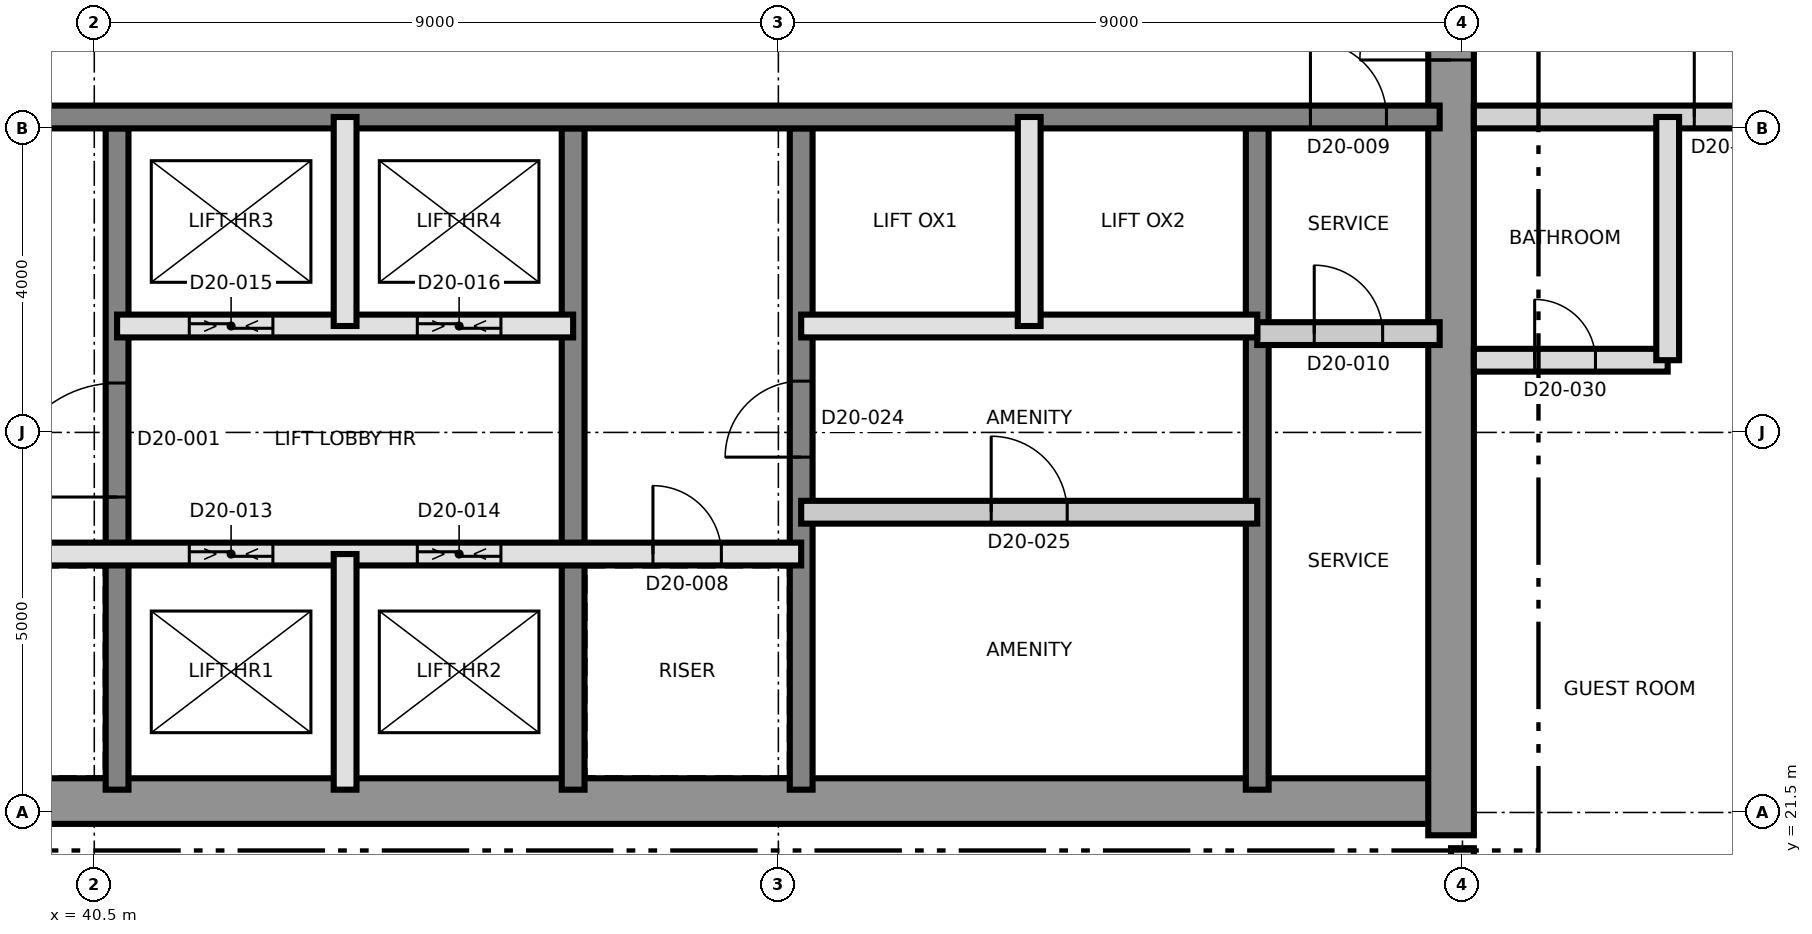
"""IFC4 building model, lengths in metres.
Left out: names, types, materials, properties, quantities, classifications, styles, units other than length and angle.
Written with IfcOpenShell. Run it as: python <this file> out.ifc"""

import sys

from ifc_helpers import new_model, si_unit, direction, frame, frame_2d, origin, place, context, subcontext, project, spatial, rectangle, extrude, element, fill, save


model = new_model("IFC4")
c1 = context("Model", 3, precision=1e-05, world=origin(), true_north=direction((0.0, 1.0)))
c2 = subcontext(c1, "Body", "Model", "MODEL_VIEW")
j1 = project(units=[si_unit("LENGTHUNIT", "METRE"), si_unit("PLANEANGLEUNIT", "RADIAN")], contexts=[c1])
p1 = place(None, origin())
s1 = spatial("IfcSite", under=j1, at=p1, CompositionType="ELEMENT")
p2 = place(p1, origin())
s2 = spatial("IfcBuilding", under=s1, at=p2, CompositionType="ELEMENT")
p3 = place(p2, frame((0.0, 0.0, 182.9)))
s3 = spatial("IfcBuildingStorey", under=s2, at=p3, CompositionType="ELEMENT", Elevation=182.9)
p4 = place(p3, frame((31.2, 21.65, 0.0), z_axis=(0.0, 0.0, 1.0), x_axis=(1.0, 0.0, 0.0)))
e1 = element("IfcWall", 1, at=p4, inside=s3, PredefinedType="SHEAR", context=c2, shape_type="SweptSolid", body=[
    extrude(rectangle(XDim=27.0, YDim=0.6, at=frame_2d((13.5, 0.0))), origin(), (0.0, 0.0, 1.0), 3.7),
])
p5 = place(p3, frame((58.35, 21.2, 0.0), z_axis=(0.0, 0.0, 1.0), x_axis=(0.0, 1.0, 0.0)))
e2 = element("IfcWall", 2, at=p5, inside=s3, PredefinedType="SHEAR", context=c2, shape_type="SweptSolid", body=[
    extrude(rectangle(XDim=18.6, YDim=0.6, at=frame_2d((9.3, 0.0))), origin(), (0.0, 0.0, 1.0), 3.7),
])
p6 = place(p5, frame((10.2, 0.0, 0.0)))
e3 = element("IfcOpeningElement", 3, at=p6, cuts=e2, PredefinedType="OPENING", context=c2, shape_type="SweptSolid", body=[
    extrude(rectangle(XDim=1.2, YDim=2.1, at=frame_2d((0.6, 1.05))), frame((0.0, 0.31, 0.0), z_axis=(0.0, -1.0, 0.0), x_axis=(1.0, 0.0, 0.0)), (0.0, 0.0, 1.0), 0.62),
])
p7 = place(p3, frame((40.8, 21.8, 0.0), z_axis=(0.0, 0.0, 1.0), x_axis=(0.0, 1.0, 0.0)))
e4 = element("IfcWall", 4, at=p7, inside=s3, PredefinedType="SHEAR", context=c2, shape_type="SweptSolid", body=[
    extrude(rectangle(XDim=8.7, YDim=0.3, at=frame_2d((4.35, 0.0))), origin(), (0.0, 0.0, 1.0), 3.7),
])
p8 = place(p7, frame((3.85, 0.0, 0.0)))
e5 = element("IfcOpeningElement", 5, at=p8, cuts=e4, PredefinedType="OPENING", context=c2, shape_type="SweptSolid", body=[
    extrude(rectangle(XDim=1.5, YDim=2.1, at=frame_2d((0.75, 1.05))), frame((0.0, 0.16, 0.0), z_axis=(0.0, -1.0, 0.0), x_axis=(1.0, 0.0, 0.0)), (0.0, 0.0, 1.0), 0.32),
])
p9 = place(p3, frame((46.8, 21.8, 0.0), z_axis=(0.0, 0.0, 1.0), x_axis=(0.0, 1.0, 0.0)))
e6 = element("IfcWall", 6, at=p9, inside=s3, PredefinedType="SHEAR", context=c2, shape_type="SweptSolid", body=[
    extrude(rectangle(XDim=8.7, YDim=0.3, at=frame_2d((4.35, 0.0))), origin(), (0.0, 0.0, 1.0), 3.7),
])
p10 = place(p3, frame((49.8, 21.8, 0.0), z_axis=(0.0, 0.0, 1.0), x_axis=(0.0, 1.0, 0.0)))
e7 = element("IfcWall", 7, at=p10, inside=s3, PredefinedType="SHEAR", context=c2, shape_type="SweptSolid", body=[
    extrude(rectangle(XDim=8.7, YDim=0.3, at=frame_2d((4.35, 0.0))), origin(), (0.0, 0.0, 1.0), 3.7),
])
p11 = place(p10, frame((4.375, 0.0, 0.0)))
e8 = element("IfcOpeningElement", 8, at=p11, cuts=e7, PredefinedType="OPENING", context=c2, shape_type="SweptSolid", body=[
    extrude(rectangle(XDim=1.0, YDim=2.1, at=frame_2d((0.5, 1.05))), frame((0.0, 0.16, 0.0), z_axis=(0.0, -1.0, 0.0), x_axis=(1.0, 0.0, 0.0)), (0.0, 0.0, 1.0), 0.32),
])
p12 = place(p3, frame((55.8, 21.8, 0.0), z_axis=(0.0, 0.0, 1.0), x_axis=(0.0, 1.0, 0.0)))
e9 = element("IfcWall", 9, at=p12, inside=s3, PredefinedType="SHEAR", context=c2, shape_type="SweptSolid", body=[
    extrude(rectangle(XDim=8.7, YDim=0.3, at=frame_2d((4.35, 0.0))), origin(), (0.0, 0.0, 1.0), 3.7),
])
p13 = place(p3, frame((31.8, 30.65, 0.0), z_axis=(0.0, 0.0, 1.0), x_axis=(1.0, 0.0, 0.0)))
e10 = element("IfcWall", 10, at=p13, inside=s3, PredefinedType="SHEAR", context=c2, shape_type="SweptSolid", body=[
    extrude(rectangle(XDim=26.4, YDim=0.3, at=frame_2d((13.2, 0.0))), origin(), (0.0, 0.0, 1.0), 3.7),
])
p14 = place(p13, frame((24.7, 0.0, 0.0)))
e11 = element("IfcOpeningElement", 11, at=p14, cuts=e10, PredefinedType="OPENING", context=c2, shape_type="SweptSolid", body=[
    extrude(rectangle(XDim=1.0, YDim=2.1, at=frame_2d((0.5, 1.05))), frame((0.0, 0.16, 0.0), z_axis=(0.0, -1.0, 0.0), x_axis=(1.0, 0.0, 0.0)), (0.0, 0.0, 1.0), 0.32),
])
p15 = place(p13, frame((4.0, 0.0, 0.0)))
e12 = element("IfcOpeningElement", 12, at=p15, cuts=e10, PredefinedType="OPENING", context=c2, shape_type="SweptSolid", body=[
    extrude(rectangle(XDim=1.0, YDim=2.1, at=frame_2d((0.5, 1.05))), frame((0.0, 0.16, 0.0), z_axis=(0.0, -1.0, 0.0), x_axis=(1.0, 0.0, 0.0)), (0.0, 0.0, 1.0), 0.32),
])
p16 = place(p3, frame((37.8, 24.9, 0.0), z_axis=(0.0, 0.0, 1.0), x_axis=(1.0, 0.0, 0.0)))
e13 = element("IfcWall", 13, at=p16, inside=s3, PredefinedType="SOLIDWALL", context=c2, shape_type="SweptSolid", body=[
    extrude(rectangle(XDim=12.0, YDim=0.3, at=frame_2d((6.0, 0.0))), origin(), (0.0, 0.0, 1.0), 3.4),
])
p17 = place(p16, frame((1.05, 0.0, 0.0)))
e14 = element("IfcOpeningElement", 14, at=p17, cuts=e13, PredefinedType="OPENING", context=c2, shape_type="SweptSolid", body=[
    extrude(rectangle(XDim=0.9, YDim=2.1, at=frame_2d((0.45, 1.05))), frame((0.0, 0.16, 0.0), z_axis=(0.0, -1.0, 0.0), x_axis=(1.0, 0.0, 0.0)), (0.0, 0.0, 1.0), 0.32),
])
p18 = place(p16, frame((10.05, 0.0, 0.0)))
e15 = element("IfcOpeningElement", 15, at=p18, cuts=e13, PredefinedType="OPENING", context=c2, shape_type="SweptSolid", body=[
    extrude(rectangle(XDim=0.9, YDim=2.1, at=frame_2d((0.45, 1.05))), frame((0.0, 0.16, 0.0), z_axis=(0.0, -1.0, 0.0), x_axis=(1.0, 0.0, 0.0)), (0.0, 0.0, 1.0), 0.32),
])
p19 = place(p16, frame((3.95, 0.0, 0.0)))
e16 = element("IfcOpeningElement", 16, at=p19, cuts=e13, PredefinedType="OPENING", context=c2, shape_type="SweptSolid", body=[
    extrude(rectangle(XDim=1.1, YDim=2.4, at=frame_2d((0.55, 1.2))), frame((0.0, 0.16, 0.0), z_axis=(0.0, -1.0, 0.0), x_axis=(1.0, 0.0, 0.0)), (0.0, 0.0, 1.0), 0.32),
])
p20 = place(p16, frame((6.95, 0.0, 0.0)))
e17 = element("IfcOpeningElement", 17, at=p20, cuts=e13, PredefinedType="OPENING", context=c2, shape_type="SweptSolid", body=[
    extrude(rectangle(XDim=1.1, YDim=2.4, at=frame_2d((0.55, 1.2))), frame((0.0, 0.16, 0.0), z_axis=(0.0, -1.0, 0.0), x_axis=(1.0, 0.0, 0.0)), (0.0, 0.0, 1.0), 0.32),
])
p21 = place(p3, frame((49.8, 25.45, 0.0), z_axis=(0.0, 0.0, 1.0), x_axis=(1.0, 0.0, 0.0)))
e18 = element("IfcWall", 18, at=p21, inside=s3, PredefinedType="PARTITIONING", context=c2, shape_type="SweptSolid", body=[
    extrude(rectangle(XDim=6.0, YDim=0.3, at=frame_2d((3.0, 0.0))), origin(), (0.0, 0.0, 1.0), 3.4),
])
p22 = place(p21, frame((2.5, 0.0, 0.0)))
e19 = element("IfcOpeningElement", 19, at=p22, cuts=e18, PredefinedType="OPENING", context=c2, shape_type="SweptSolid", body=[
    extrude(rectangle(XDim=1.0, YDim=2.1, at=frame_2d((0.5, 1.05))), frame((0.0, 0.16, 0.0), z_axis=(0.0, -1.0, 0.0), x_axis=(1.0, 0.0, 0.0)), (0.0, 0.0, 1.0), 0.32),
])
p23 = place(p3, frame((55.8, 27.8, 0.0), z_axis=(0.0, 0.0, 1.0), x_axis=(1.0, 0.0, 0.0)))
e20 = element("IfcWall", 20, at=p23, inside=s3, PredefinedType="PARTITIONING", context=c2, shape_type="SweptSolid", body=[
    extrude(rectangle(XDim=2.4, YDim=0.3, at=frame_2d((1.2, 0.0))), origin(), (0.0, 0.0, 1.0), 3.4),
])
p24 = place(p23, frame((0.75, 0.0, 0.0)))
e21 = element("IfcOpeningElement", 21, at=p24, cuts=e20, PredefinedType="OPENING", context=c2, shape_type="SweptSolid", body=[
    extrude(rectangle(XDim=0.9, YDim=2.1, at=frame_2d((0.45, 1.05))), frame((0.0, 0.16, 0.0), z_axis=(0.0, -1.0, 0.0), x_axis=(1.0, 0.0, 0.0)), (0.0, 0.0, 1.0), 0.32),
])
p25 = place(p3, frame((40.8, 27.9, 0.0), z_axis=(0.0, 0.0, 1.0), x_axis=(1.0, 0.0, 0.0)))
e22 = element("IfcWall", 22, at=p25, inside=s3, PredefinedType="SOLIDWALL", context=c2, shape_type="SweptSolid", body=[
    extrude(rectangle(XDim=6.0, YDim=0.3, at=frame_2d((3.0, 0.0))), origin(), (0.0, 0.0, 1.0), 3.4),
])
p26 = place(p25, frame((0.95, 0.0, 0.0)))
e23 = element("IfcOpeningElement", 23, at=p26, cuts=e22, PredefinedType="OPENING", context=c2, shape_type="SweptSolid", body=[
    extrude(rectangle(XDim=1.1, YDim=2.4, at=frame_2d((0.55, 1.2))), frame((0.0, 0.16, 0.0), z_axis=(0.0, -1.0, 0.0), x_axis=(1.0, 0.0, 0.0)), (0.0, 0.0, 1.0), 0.32),
])
p27 = place(p25, frame((3.95, 0.0, 0.0)))
e24 = element("IfcOpeningElement", 24, at=p27, cuts=e22, PredefinedType="OPENING", context=c2, shape_type="SweptSolid", body=[
    extrude(rectangle(XDim=1.1, YDim=2.4, at=frame_2d((0.55, 1.2))), frame((0.0, 0.16, 0.0), z_axis=(0.0, -1.0, 0.0), x_axis=(1.0, 0.0, 0.0)), (0.0, 0.0, 1.0), 0.32),
])
p28 = place(p3, frame((49.8, 27.9, 0.0), z_axis=(0.0, 0.0, 1.0), x_axis=(1.0, 0.0, 0.0)))
e25 = element("IfcWall", 25, at=p28, inside=s3, PredefinedType="SOLIDWALL", context=c2, shape_type="SweptSolid", body=[
    extrude(rectangle(XDim=6.0, YDim=0.3, at=frame_2d((3.0, 0.0))), origin(), (0.0, 0.0, 1.0), 3.4),
])
p29 = place(p3, frame((43.8, 21.8, 0.0), z_axis=(0.0, 0.0, 1.0), x_axis=(0.0, 1.0, 0.0)))
e26 = element("IfcWall", 26, at=p29, inside=s3, PredefinedType="SOLIDWALL", context=c2, shape_type="SweptSolid", body=[
    extrude(rectangle(XDim=3.1, YDim=0.3, at=frame_2d((1.55, 0.0))), origin(), (0.0, 0.0, 1.0), 3.4),
])
for number, where, z_axis, x_axis in (
    (27, (43.8, 27.9, 0.0), (0.0, 0.0, 1.0), (0.0, 1.0, 0.0)),
    (28, (52.8, 27.9, 0.0), (0.0, 0.0, 1.0), (0.0, 1.0, 0.0)),
):
    element("IfcWall", number, at=place(p3, frame(where, z_axis=z_axis, x_axis=x_axis)), inside=s3, PredefinedType="SOLIDWALL", context=c2, shape_type="SweptSolid", body=[
        extrude(rectangle(XDim=2.75, YDim=0.3, at=frame_2d((1.375, 0.0))), origin(), (0.0, 0.0, 1.0), 3.4),
    ])
p30 = place(p3, frame((58.65, 27.45, 0.0), z_axis=(0.0, 0.0, 1.0), x_axis=(1.0, 0.0, 0.0)))
e29 = element("IfcWall", 29, at=p30, inside=s3, PredefinedType="PARTITIONING", context=c2, shape_type="SweptSolid", body=[
    extrude(rectangle(XDim=2.55, YDim=0.3, at=frame_2d((1.275, 0.0))), origin(), (0.0, 0.0, 1.0), 3.4),
])
p31 = place(p30, frame((0.8, 0.0, 0.0)))
e30 = element("IfcOpeningElement", 30, at=p31, cuts=e29, PredefinedType="OPENING", context=c2, shape_type="SweptSolid", body=[
    extrude(rectangle(XDim=0.8, YDim=2.1, at=frame_2d((0.4, 1.05))), frame((0.0, 0.16, 0.0), z_axis=(0.0, -1.0, 0.0), x_axis=(1.0, 0.0, 0.0)), (0.0, 0.0, 1.0), 0.32),
])
p32 = place(p3, frame((58.65, 30.65, 0.0), z_axis=(0.0, 0.0, 1.0), x_axis=(1.0, 0.0, 0.0)))
e31 = element("IfcWall", 31, at=p32, inside=s3, PredefinedType="PARTITIONING", context=c2, shape_type="SweptSolid", body=[
    extrude(rectangle(XDim=26.68, YDim=0.3, at=frame_2d((13.34, 0.0))), origin(), (0.0, 0.0, 1.0), 3.4),
])
p33 = place(p32, frame((2.9, 0.0, 0.0)))
e32 = element("IfcOpeningElement", 32, at=p33, cuts=e31, PredefinedType="OPENING", context=c2, shape_type="SweptSolid", body=[
    extrude(rectangle(XDim=1.0, YDim=2.1, at=frame_2d((0.5, 1.05))), frame((0.0, 0.16, 0.0), z_axis=(0.0, -1.0, 0.0), x_axis=(1.0, 0.0, 0.0)), (0.0, 0.0, 1.0), 0.32),
])
p34 = place(p32, frame((5.85, 0.0, 0.0)))
e33 = element("IfcOpeningElement", 33, at=p34, cuts=e31, PredefinedType="OPENING", context=c2, shape_type="SweptSolid", body=[
    extrude(rectangle(XDim=1.4, YDim=2.1, at=frame_2d((0.7, 1.05))), frame((0.0, 0.16, 0.0), z_axis=(0.0, -1.0, 0.0), x_axis=(1.0, 0.0, 0.0)), (0.0, 0.0, 1.0), 0.32),
])
p35 = place(p32, frame((10.0, 0.0, 0.0)))
e34 = element("IfcOpeningElement", 34, at=p35, cuts=e31, PredefinedType="OPENING", context=c2, shape_type="SweptSolid", body=[
    extrude(rectangle(XDim=1.0, YDim=2.1, at=frame_2d((0.5, 1.05))), frame((0.0, 0.16, 0.0), z_axis=(0.0, -1.0, 0.0), x_axis=(1.0, 0.0, 0.0)), (0.0, 0.0, 1.0), 0.32),
])
p36 = place(p32, frame((15.85, 0.0, 0.0)))
e35 = element("IfcOpeningElement", 35, at=p36, cuts=e31, PredefinedType="OPENING", context=c2, shape_type="SweptSolid", body=[
    extrude(rectangle(XDim=1.0, YDim=2.1, at=frame_2d((0.5, 1.05))), frame((0.0, 0.16, 0.0), z_axis=(0.0, -1.0, 0.0), x_axis=(1.0, 0.0, 0.0)), (0.0, 0.0, 1.0), 0.32),
])
p37 = place(p32, frame((20.2, 0.0, 0.0)))
e36 = element("IfcOpeningElement", 36, at=p37, cuts=e31, PredefinedType="OPENING", context=c2, shape_type="SweptSolid", body=[
    extrude(rectangle(XDim=1.0, YDim=2.1, at=frame_2d((0.5, 1.05))), frame((0.0, 0.16, 0.0), z_axis=(0.0, -1.0, 0.0), x_axis=(1.0, 0.0, 0.0)), (0.0, 0.0, 1.0), 0.32),
])
p38 = place(p3, frame((58.5, 19.17, 0.0), z_axis=(0.0, 0.0, 1.0), x_axis=(0.0, 1.0, 0.0)))
e37 = element("IfcWall", 37, at=p38, inside=s3, PredefinedType="PARTITIONING", context=c2, shape_type="SweptSolid", body=[
    extrude(rectangle(XDim=1.86, YDim=0.3, at=frame_2d((0.93, 0.0))), origin(), (0.0, 0.0, 1.0), 3.4),
])
p39 = place(p3, frame((61.2, 27.45, 0.0), z_axis=(0.0, 0.0, 1.0), x_axis=(0.0, 1.0, 0.0)))
e38 = element("IfcWall", 38, at=p39, inside=s3, PredefinedType="PARTITIONING", context=c2, shape_type="SweptSolid", body=[
    extrude(rectangle(XDim=3.2, YDim=0.3, at=frame_2d((1.6, 0.0))), origin(), (0.0, 0.0, 1.0), 3.4),
])
p40 = place(p8, origin())
e39 = element("IfcDoor", 39, at=p40, inside=s3, OperationType="SINGLE_SWING_RIGHT", PredefinedType="DOOR", context=c2, shape_type="SweptSolid", body=[
    extrude(rectangle(XDim=1.5, YDim=2.1, at=frame_2d((0.75, 1.05))), frame((0.0, 0.025, 0.0), z_axis=(0.0, -1.0, 0.0), x_axis=(1.0, 0.0, 0.0)), (0.0, 0.0, 1.0), 0.05),
])
fill(e5, e39)
p41 = place(p18, origin())
e40 = element("IfcDoor", 40, at=p41, inside=s3, OperationType="SINGLE_SWING_RIGHT", PredefinedType="DOOR", context=c2, shape_type="SweptSolid", body=[
    extrude(rectangle(XDim=0.9, YDim=2.1, at=frame_2d((0.45, 1.05))), frame((0.0, 0.025, 0.0), z_axis=(0.0, -1.0, 0.0), x_axis=(1.0, 0.0, 0.0)), (0.0, 0.0, 1.0), 0.05),
])
fill(e15, e40)
p42 = place(p14, origin())
e41 = element("IfcDoor", 41, at=p42, inside=s3, OperationType="SINGLE_SWING_LEFT", PredefinedType="DOOR", context=c2, shape_type="SweptSolid", body=[
    extrude(rectangle(XDim=1.0, YDim=2.1, at=frame_2d((0.5, 1.05))), frame((0.0, 0.025, 0.0), z_axis=(0.0, -1.0, 0.0), x_axis=(1.0, 0.0, 0.0)), (0.0, 0.0, 1.0), 0.05),
])
fill(e11, e41)
p43 = place(p24, origin())
e42 = element("IfcDoor", 42, at=p43, inside=s3, OperationType="SINGLE_SWING_RIGHT", PredefinedType="DOOR", context=c2, shape_type="SweptSolid", body=[
    extrude(rectangle(XDim=0.9, YDim=2.1, at=frame_2d((0.45, 1.05))), frame((0.0, 0.025, 0.0), z_axis=(0.0, -1.0, 0.0), x_axis=(1.0, 0.0, 0.0)), (0.0, 0.0, 1.0), 0.05),
])
fill(e21, e42)
p44 = place(p6, origin())
e43 = element("IfcDoor", 43, at=p44, inside=s3, OperationType="SINGLE_SWING_LEFT", PredefinedType="DOOR", context=c2, shape_type="SweptSolid", body=[
    extrude(rectangle(XDim=1.2, YDim=2.1, at=frame_2d((0.6, 1.05))), frame((0.0, 0.025, 0.0), z_axis=(0.0, -1.0, 0.0), x_axis=(1.0, 0.0, 0.0)), (0.0, 0.0, 1.0), 0.05),
])
fill(e3, e43)
p45 = place(p19, origin())
e44 = element("IfcDoor", 44, at=p45, inside=s3, OperationType="SLIDING_TO_LEFT", PredefinedType="DOOR", context=c2, shape_type="SweptSolid", body=[
    extrude(rectangle(XDim=1.1, YDim=2.4, at=frame_2d((0.55, 1.2))), frame((0.0, 0.025, 0.0), z_axis=(0.0, -1.0, 0.0), x_axis=(1.0, 0.0, 0.0)), (0.0, 0.0, 1.0), 0.05),
])
fill(e16, e44)
p46 = place(p20, origin())
e45 = element("IfcDoor", 45, at=p46, inside=s3, OperationType="SLIDING_TO_LEFT", PredefinedType="DOOR", context=c2, shape_type="SweptSolid", body=[
    extrude(rectangle(XDim=1.1, YDim=2.4, at=frame_2d((0.55, 1.2))), frame((0.0, 0.025, 0.0), z_axis=(0.0, -1.0, 0.0), x_axis=(1.0, 0.0, 0.0)), (0.0, 0.0, 1.0), 0.05),
])
fill(e17, e45)
p47 = place(p26, origin())
e46 = element("IfcDoor", 46, at=p47, inside=s3, OperationType="SLIDING_TO_LEFT", PredefinedType="DOOR", context=c2, shape_type="SweptSolid", body=[
    extrude(rectangle(XDim=1.1, YDim=2.4, at=frame_2d((0.55, 1.2))), frame((0.0, 0.025, 0.0), z_axis=(0.0, -1.0, 0.0), x_axis=(1.0, 0.0, 0.0)), (0.0, 0.0, 1.0), 0.05),
])
fill(e23, e46)
p48 = place(p27, origin())
e47 = element("IfcDoor", 47, at=p48, inside=s3, OperationType="SLIDING_TO_LEFT", PredefinedType="DOOR", context=c2, shape_type="SweptSolid", body=[
    extrude(rectangle(XDim=1.1, YDim=2.4, at=frame_2d((0.55, 1.2))), frame((0.0, 0.025, 0.0), z_axis=(0.0, -1.0, 0.0), x_axis=(1.0, 0.0, 0.0)), (0.0, 0.0, 1.0), 0.05),
])
fill(e24, e47)
p49 = place(p11, origin())
e48 = element("IfcDoor", 48, at=p49, inside=s3, OperationType="SINGLE_SWING_RIGHT", PredefinedType="DOOR", context=c2, shape_type="SweptSolid", body=[
    extrude(rectangle(XDim=1.0, YDim=2.1, at=frame_2d((0.5, 1.05))), frame((0.0, 0.025, 0.0), z_axis=(0.0, -1.0, 0.0), x_axis=(1.0, 0.0, 0.0)), (0.0, 0.0, 1.0), 0.05),
])
fill(e8, e48)
p50 = place(p22, origin())
e49 = element("IfcDoor", 49, at=p50, inside=s3, OperationType="SINGLE_SWING_RIGHT", PredefinedType="DOOR", context=c2, shape_type="SweptSolid", body=[
    extrude(rectangle(XDim=1.0, YDim=2.1, at=frame_2d((0.5, 1.05))), frame((0.0, 0.025, 0.0), z_axis=(0.0, -1.0, 0.0), x_axis=(1.0, 0.0, 0.0)), (0.0, 0.0, 1.0), 0.05),
])
fill(e19, e49)
p51 = place(p31, origin())
e50 = element("IfcDoor", 50, at=p51, inside=s3, OperationType="SINGLE_SWING_LEFT", PredefinedType="DOOR", context=c2, shape_type="SweptSolid", body=[
    extrude(rectangle(XDim=0.8, YDim=2.1, at=frame_2d((0.4, 1.05))), frame((0.0, 0.025, 0.0), z_axis=(0.0, -1.0, 0.0), x_axis=(1.0, 0.0, 0.0)), (0.0, 0.0, 1.0), 0.05),
])
fill(e30, e50)
p52 = place(p33, origin())
e51 = element("IfcDoor", 51, at=p52, inside=s3, OperationType="SINGLE_SWING_LEFT", PredefinedType="DOOR", context=c2, shape_type="SweptSolid", body=[
    extrude(rectangle(XDim=1.0, YDim=2.1, at=frame_2d((0.5, 1.05))), frame((0.0, 0.025, 0.0), z_axis=(0.0, -1.0, 0.0), x_axis=(1.0, 0.0, 0.0)), (0.0, 0.0, 1.0), 0.05),
])
fill(e32, e51)
save(model, sys.argv[1])
